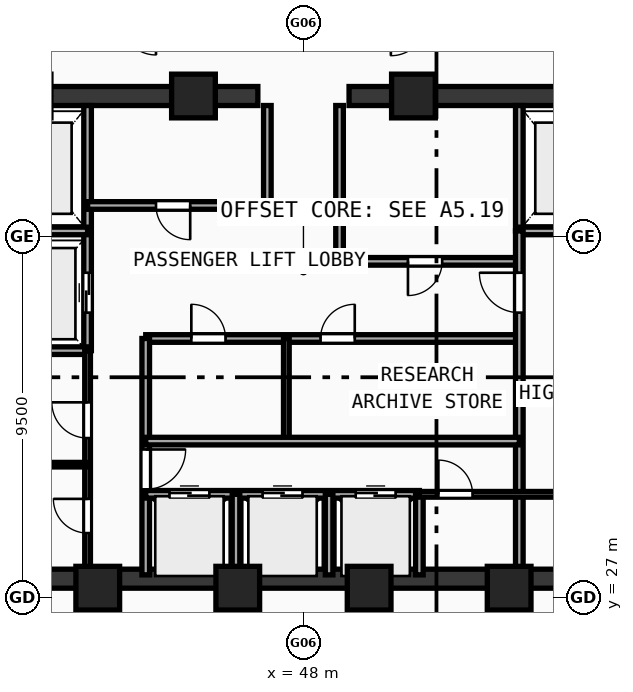
"""IFC4 building model, lengths in metres.
Left out: names, types, materials, properties, quantities, classifications, styles, units other than length and angle.
Written with IfcOpenShell. Run it as: python <this file> out.ifc"""

import sys

from ifc_helpers import new_model, si_unit, direction, frame, frame_2d, origin, origin_with_axes, origin_2d, place, context, subcontext, project, spatial, rectangle, hollow_rectangle, extrude, source, transform, mapped, element, fill, save


model = new_model("IFC4")
c1 = context("Model", 3, precision=1e-05, world=origin(), true_north=direction((0.0, 1.0)))
c2 = subcontext(c1, "Body", "Model", "MODEL_VIEW")
j1 = project(units=[si_unit("LENGTHUNIT", "METRE"), si_unit("PLANEANGLEUNIT", "RADIAN")], contexts=[c1])
p1 = place(None, origin())
s1 = spatial("IfcSite", under=j1, at=p1, CompositionType="ELEMENT")
p2 = place(p1, origin())
s2 = spatial("IfcBuilding", under=s1, at=p2, CompositionType="ELEMENT")
p3 = place(p2, frame((0.0, 0.0, 311.13)))
s3 = spatial("IfcBuildingStorey", under=s2, at=p3, CompositionType="ELEMENT", Elevation=311.13)
p4 = place(p3, frame((35.55, 27.5, 0.0), z_axis=(0.0, 0.0, 1.0), x_axis=(1.0, 0.0, 0.0)))
e1 = element("IfcWall", 1, at=p4, inside=s3, PredefinedType="SHEAR", context=c2, shape_type="SweptSolid", body=[
    extrude(rectangle(XDim=24.9, YDim=0.5, at=frame_2d((12.45, 0.0))), origin(), (0.0, 0.0, 1.0), 3.47),
])
p5 = place(p3, frame((35.55, 40.2, 0.0), z_axis=(0.0, 0.0, 1.0), x_axis=(1.0, 0.0, 0.0)))
e2 = element("IfcWall", 2, at=p5, inside=s3, PredefinedType="SHEAR", context=c2, shape_type="SweptSolid", body=[
    extrude(rectangle(XDim=11.25, YDim=0.5, at=frame_2d((5.625, 0.0))), origin(), (0.0, 0.0, 1.0), 3.47),
])
p6 = place(p5, frame((1.6, 0.0, 0.0)))
e3 = element("IfcOpeningElement", 3, at=p6, cuts=e2, PredefinedType="OPENING", context=c2, shape_type="SweptSolid", body=[
    extrude(rectangle(XDim=1.05, YDim=2.1, at=frame_2d((0.525, 1.05))), frame((0.0, 0.26, 0.0), z_axis=(0.0, -1.0, 0.0), x_axis=(1.0, 0.0, 0.0)), (0.0, 0.0, 1.0), 0.52),
])
p7 = place(p3, frame((49.2, 40.2, 0.0), z_axis=(0.0, 0.0, 1.0), x_axis=(1.0, 0.0, 0.0)))
e4 = element("IfcWall", 4, at=p7, inside=s3, PredefinedType="SHEAR", context=c2, shape_type="SweptSolid", body=[
    extrude(rectangle(XDim=11.25, YDim=0.5, at=frame_2d((5.625, 0.0))), origin(), (0.0, 0.0, 1.0), 3.47),
])
p8 = place(p7, frame((8.6, 0.0, 0.0)))
e5 = element("IfcOpeningElement", 5, at=p8, cuts=e4, PredefinedType="OPENING", context=c2, shape_type="SweptSolid", body=[
    extrude(rectangle(XDim=1.05, YDim=2.1, at=frame_2d((0.525, 1.05))), frame((0.0, 0.26, 0.0), z_axis=(0.0, -1.0, 0.0), x_axis=(1.0, 0.0, 0.0)), (0.0, 0.0, 1.0), 0.52),
])
m1 = source(origin(), c2, "Body", "SweptSolid", [
    extrude(hollow_rectangle(XDim=1.15, YDim=1.15, WallThickness=0.048, at=origin_2d()), origin(), (0.0, 0.0, 1.0), 3.73),
])
for number, where, z_axis, x_axis in (
    (6, (42.588, 27.25, -0.26), (0.0, 0.0, 1.0), (1.0, 0.0, 0.0)),
    (7, (46.272, 27.25, -0.26), (0.0, 0.0, 1.0), (1.0, 0.0, 0.0)),
    (8, (49.729, 27.25, -0.26), (0.0, 0.0, 1.0), (1.0, 0.0, 0.0)),
    (9, (53.412, 27.25, -0.26), (0.0, 0.0, 1.0), (1.0, 0.0, 0.0)),
    (10, (50.894, 40.2, -0.26), (0.0, 0.0, 1.0), (1.0, 0.0, 0.0)),
    (11, (45.106, 40.2, -0.26), (0.0, 0.0, 1.0), (1.0, 0.0, 0.0)),
):
    element("IfcColumn", number, at=place(p3, frame(where, z_axis=z_axis, x_axis=x_axis)), inside=s3, PredefinedType="COLUMN", context=c2, shape_type="MappedRepresentation", body=[
        mapped(m1, transform((0.0, 0.0, 0.0), scale=1.0)),
    ])
p9 = place(p3, frame((42.32, 33.5, 0.0), z_axis=(0.0, 0.0, 1.0), x_axis=(0.0, 1.0, 0.0)))
e12 = element("IfcWall", 12, at=p9, inside=s3, PredefinedType="SOLIDWALL", context=c2, shape_type="SweptSolid", body=[
    extrude(rectangle(XDim=6.45, YDim=0.2, at=frame_2d((3.225, 0.0))), origin(), (0.0, 0.0, 1.0), 3.47),
])
p10 = place(p9, frame((1.0, 0.0, 0.0)))
e13 = element("IfcOpeningElement", 13, at=p10, cuts=e12, PredefinedType="OPENING", context=c2, shape_type="SweptSolid", body=[
    extrude(rectangle(XDim=1.05, YDim=2.1, at=frame_2d((0.525, 1.05))), frame((0.0, 0.11, 0.0), z_axis=(0.0, -1.0, 0.0), x_axis=(1.0, 0.0, 0.0)), (0.0, 0.0, 1.0), 0.22),
])
for number, where, z_axis, x_axis in (
    (14, (39.6, 36.65, 0.0), (0.0, 0.0, 1.0), (1.0, 0.0, 0.0)),
    (15, (39.6, 33.5, 0.0), (0.0, 0.0, 1.0), (1.0, 0.0, 0.0)),
):
    element("IfcWall", number, at=place(p3, frame(where, z_axis=z_axis, x_axis=x_axis)), inside=s3, PredefinedType="SOLIDWALL", context=c2, shape_type="SweptSolid", body=[
        extrude(rectangle(XDim=2.72, YDim=0.2, at=frame_2d((1.36, 0.0))), origin(), (0.0, 0.0, 1.0), 3.47),
    ])
p11 = place(p3, frame((53.68, 36.65, 0.0), z_axis=(0.0, 0.0, 1.0), x_axis=(0.0, 1.0, 0.0)))
e16 = element("IfcWall", 16, at=p11, inside=s3, PredefinedType="SOLIDWALL", context=c2, shape_type="SweptSolid", body=[
    extrude(rectangle(XDim=3.3, YDim=0.2, at=frame_2d((1.65, 0.0))), origin(), (0.0, 0.0, 1.0), 3.47),
])
p12 = place(p3, frame((53.68, 36.65, 0.0), z_axis=(0.0, 0.0, 1.0), x_axis=(1.0, 0.0, 0.0)))
e17 = element("IfcWall", 17, at=p12, inside=s3, PredefinedType="SOLIDWALL", context=c2, shape_type="SweptSolid", body=[
    extrude(rectangle(XDim=2.72, YDim=0.2, at=frame_2d((1.36, 0.0))), origin(), (0.0, 0.0, 1.0), 3.47),
])
p13 = place(p3, frame((42.32, 37.32, 0.0), z_axis=(0.0, 0.0, 1.0), x_axis=(1.0, 0.0, 0.0)))
e18 = element("IfcWall", 18, at=p13, inside=s3, PredefinedType="SOLIDWALL", context=c2, shape_type="SweptSolid", body=[
    extrude(rectangle(XDim=4.73, YDim=0.2, at=frame_2d((2.365, 0.0))), origin(), (0.0, 0.0, 1.0), 3.47),
])
p14 = place(p13, frame((1.8, 0.0, 0.0)))
e19 = element("IfcOpeningElement", 19, at=p14, cuts=e18, PredefinedType="OPENING", context=c2, shape_type="SweptSolid", body=[
    extrude(rectangle(XDim=0.9, YDim=2.1, at=frame_2d((0.45, 1.05))), frame((0.0, 0.11, 0.0), z_axis=(0.0, -1.0, 0.0), x_axis=(1.0, 0.0, 0.0)), (0.0, 0.0, 1.0), 0.22),
])
p15 = place(p3, frame((48.95, 35.85, 0.0), z_axis=(0.0, 0.0, 1.0), x_axis=(1.0, 0.0, 0.0)))
e20 = element("IfcWall", 20, at=p15, inside=s3, PredefinedType="SOLIDWALL", context=c2, shape_type="SweptSolid", body=[
    extrude(rectangle(XDim=4.73, YDim=0.2, at=frame_2d((2.365, 0.0))), origin(), (0.0, 0.0, 1.0), 3.47),
])
p16 = place(p15, frame((1.8, 0.0, 0.0)))
e21 = element("IfcOpeningElement", 21, at=p16, cuts=e20, PredefinedType="OPENING", context=c2, shape_type="SweptSolid", body=[
    extrude(rectangle(XDim=0.9, YDim=2.1, at=frame_2d((0.45, 1.05))), frame((0.0, 0.11, 0.0), z_axis=(0.0, -1.0, 0.0), x_axis=(1.0, 0.0, 0.0)), (0.0, 0.0, 1.0), 0.22),
])
p17 = place(p3, frame((47.05, 37.32, 0.0), z_axis=(0.0, 0.0, 1.0), x_axis=(0.0, 1.0, 0.0)))
e22 = element("IfcWall", 22, at=p17, inside=s3, PredefinedType="SOLIDWALL", context=c2, shape_type="SweptSolid", body=[
    extrude(rectangle(XDim=2.63, YDim=0.2, at=frame_2d((1.315, 0.0))), origin(), (0.0, 0.0, 1.0), 3.47),
])
p18 = place(p3, frame((48.95, 35.85, 0.0), z_axis=(0.0, 0.0, 1.0), x_axis=(0.0, 1.0, 0.0)))
e23 = element("IfcWall", 23, at=p18, inside=s3, PredefinedType="SOLIDWALL", context=c2, shape_type="SweptSolid", body=[
    extrude(rectangle(XDim=4.1, YDim=0.2, at=frame_2d((2.05, 0.0))), origin(), (0.0, 0.0, 1.0), 3.47),
])
p19 = place(p3, frame((43.85, 33.82, 0.0), z_axis=(0.0, 0.0, 1.0), x_axis=(1.0, 0.0, 0.0)))
e24 = element("IfcWall", 24, at=p19, inside=s3, PredefinedType="SOLIDWALL", context=c2, shape_type="SweptSolid", body=[
    extrude(rectangle(XDim=9.83, YDim=0.2, at=frame_2d((4.915, 0.0))), origin(), (0.0, 0.0, 1.0), 3.47),
])
p20 = place(p19, frame((1.2, 0.0, 0.0)))
e25 = element("IfcOpeningElement", 25, at=p20, cuts=e24, PredefinedType="OPENING", context=c2, shape_type="SweptSolid", body=[
    extrude(rectangle(XDim=0.9, YDim=2.1, at=frame_2d((0.45, 1.05))), frame((0.0, 0.11, 0.0), z_axis=(0.0, -1.0, 0.0), x_axis=(1.0, 0.0, 0.0)), (0.0, 0.0, 1.0), 0.22),
])
p21 = place(p19, frame((4.6, 0.0, 0.0)))
e26 = element("IfcOpeningElement", 26, at=p21, cuts=e24, PredefinedType="OPENING", context=c2, shape_type="SweptSolid", body=[
    extrude(rectangle(XDim=0.9, YDim=2.1, at=frame_2d((0.45, 1.05))), frame((0.0, 0.11, 0.0), z_axis=(0.0, -1.0, 0.0), x_axis=(1.0, 0.0, 0.0)), (0.0, 0.0, 1.0), 0.22),
])
p22 = place(p3, frame((43.85, 27.6, 0.0), z_axis=(0.0, 0.0, 1.0), x_axis=(0.0, 1.0, 0.0)))
e27 = element("IfcWall", 27, at=p22, inside=s3, PredefinedType="SOLIDWALL", context=c2, shape_type="SweptSolid", body=[
    extrude(rectangle(XDim=6.22, YDim=0.2, at=frame_2d((3.11, 0.0))), origin(), (0.0, 0.0, 1.0), 3.47),
])
p23 = place(p22, frame((2.25, 0.0, 0.0)))
e28 = element("IfcOpeningElement", 28, at=p23, cuts=e27, PredefinedType="OPENING", context=c2, shape_type="SweptSolid", body=[
    extrude(rectangle(XDim=1.05, YDim=2.1, at=frame_2d((0.525, 1.05))), frame((0.0, 0.11, 0.0), z_axis=(0.0, -1.0, 0.0), x_axis=(1.0, 0.0, 0.0)), (0.0, 0.0, 1.0), 0.22),
])
p24 = place(p3, frame((53.68, 27.6, 0.0), z_axis=(0.0, 0.0, 1.0), x_axis=(0.0, 1.0, 0.0)))
e29 = element("IfcWall", 29, at=p24, inside=s3, PredefinedType="SOLIDWALL", context=c2, shape_type="SweptSolid", body=[
    extrude(rectangle(XDim=9.05, YDim=0.2, at=frame_2d((4.525, 0.0))), origin(), (0.0, 0.0, 1.0), 3.47),
])
p25 = place(p24, frame((6.9, 0.0, 0.0)))
e30 = element("IfcOpeningElement", 30, at=p25, cuts=e29, PredefinedType="OPENING", context=c2, shape_type="SweptSolid", body=[
    extrude(rectangle(XDim=1.05, YDim=2.1, at=frame_2d((0.525, 1.05))), frame((0.0, 0.11, 0.0), z_axis=(0.0, -1.0, 0.0), x_axis=(1.0, 0.0, 0.0)), (0.0, 0.0, 1.0), 0.22),
])
p26 = place(p3, frame((47.55, 31.12, 0.0), z_axis=(0.0, 0.0, 1.0), x_axis=(0.0, 1.0, 0.0)))
e31 = element("IfcWall", 31, at=p26, inside=s3, PredefinedType="PARTITIONING", context=c2, shape_type="SweptSolid", body=[
    extrude(rectangle(XDim=2.7, YDim=0.15, at=frame_2d((1.35, 0.0))), origin(), (0.0, 0.0, 1.0), 3.47),
])
p27 = place(p3, frame((43.85, 29.72, 0.0), z_axis=(0.0, 0.0, 1.0), x_axis=(1.0, 0.0, 0.0)))
e32 = element("IfcWall", 32, at=p27, inside=s3, PredefinedType="SOLIDWALL", context=c2, shape_type="SweptSolid", body=[
    extrude(rectangle(XDim=7.2, YDim=0.2, at=frame_2d((3.6, 0.0))), origin(), (0.0, 0.0, 1.0), 3.47),
])
p28 = place(p27, frame((0.625, 0.0, 0.0)))
e33 = element("IfcOpeningElement", 33, at=p28, cuts=e32, PredefinedType="OPENING", context=c2, shape_type="SweptSolid", body=[
    extrude(rectangle(XDim=1.05, YDim=2.1, at=frame_2d((0.525, 1.05))), frame((0.0, 0.11, 0.0), z_axis=(0.0, -1.0, 0.0), x_axis=(1.0, 0.0, 0.0)), (0.0, 0.0, 1.0), 0.22),
])
p29 = place(p27, frame((3.075, 0.0, 0.0)))
e34 = element("IfcOpeningElement", 34, at=p29, cuts=e32, PredefinedType="OPENING", context=c2, shape_type="SweptSolid", body=[
    extrude(rectangle(XDim=1.05, YDim=2.1, at=frame_2d((0.525, 1.05))), frame((0.0, 0.11, 0.0), z_axis=(0.0, -1.0, 0.0), x_axis=(1.0, 0.0, 0.0)), (0.0, 0.0, 1.0), 0.22),
])
p30 = place(p27, frame((5.525, 0.0, 0.0)))
e35 = element("IfcOpeningElement", 35, at=p30, cuts=e32, PredefinedType="OPENING", context=c2, shape_type="SweptSolid", body=[
    extrude(rectangle(XDim=1.05, YDim=2.1, at=frame_2d((0.525, 1.05))), frame((0.0, 0.11, 0.0), z_axis=(0.0, -1.0, 0.0), x_axis=(1.0, 0.0, 0.0)), (0.0, 0.0, 1.0), 0.22),
])
p31 = place(p3, frame((51.05, 27.6, 0.0), z_axis=(0.0, 0.0, 1.0), x_axis=(0.0, 1.0, 0.0)))
e36 = element("IfcWall", 36, at=p31, inside=s3, PredefinedType="SOLIDWALL", context=c2, shape_type="SweptSolid", body=[
    extrude(rectangle(XDim=2.12, YDim=0.2, at=frame_2d((1.06, 0.0))), origin(), (0.0, 0.0, 1.0), 3.47),
])
p32 = place(p3, frame((43.85, 31.12, 0.0), z_axis=(0.0, 0.0, 1.0), x_axis=(1.0, 0.0, 0.0)))
e37 = element("IfcWall", 37, at=p32, inside=s3, PredefinedType="SOLIDWALL", context=c2, shape_type="SweptSolid", body=[
    extrude(rectangle(XDim=9.83, YDim=0.2, at=frame_2d((4.915, 0.0))), origin(), (0.0, 0.0, 1.0), 3.47),
])
for number, where, z_axis, x_axis in (
    (38, (46.225, 27.6, 0.0), (0.0, 0.0, 1.0), (0.0, 1.0, 0.0)),
    (39, (48.675, 27.6, 0.0), (0.0, 0.0, 1.0), (0.0, 1.0, 0.0)),
):
    element("IfcWall", number, at=place(p3, frame(where, z_axis=z_axis, x_axis=x_axis)), inside=s3, PredefinedType="SOLIDWALL", context=c2, shape_type="SweptSolid", body=[
        extrude(rectangle(XDim=2.12, YDim=0.2, at=frame_2d((1.06, 0.0))), origin(), (0.0, 0.0, 1.0), 3.47),
    ])
p33 = place(p3, frame((42.32, 27.6, 0.0), z_axis=(0.0, 0.0, 1.0), x_axis=(0.0, 1.0, 0.0)))
e40 = element("IfcWall", 40, at=p33, inside=s3, PredefinedType="PARTITIONING", context=c2, shape_type="SweptSolid", body=[
    extrude(rectangle(XDim=5.9, YDim=0.15, at=frame_2d((2.95, 0.0))), origin(), (0.0, 0.0, 1.0), 3.47),
])
p34 = place(p33, frame((1.1, 0.0, 0.0)))
e41 = element("IfcOpeningElement", 41, at=p34, cuts=e40, PredefinedType="OPENING", context=c2, shape_type="SweptSolid", body=[
    extrude(rectangle(XDim=0.9, YDim=2.1, at=frame_2d((0.45, 1.05))), frame((0.0, 0.085, 0.0), z_axis=(0.0, -1.0, 0.0), x_axis=(1.0, 0.0, 0.0)), (0.0, 0.0, 1.0), 0.17),
])
p35 = place(p33, frame((3.6, 0.0, 0.0)))
e42 = element("IfcOpeningElement", 42, at=p35, cuts=e40, PredefinedType="OPENING", context=c2, shape_type="SweptSolid", body=[
    extrude(rectangle(XDim=0.94, YDim=2.1, at=frame_2d((0.47, 1.05))), frame((0.0, 0.085, 0.0), z_axis=(0.0, -1.0, 0.0), x_axis=(1.0, 0.0, 0.0)), (0.0, 0.0, 1.0), 0.17),
])
p36 = place(p3, frame((51.05, 29.72, 0.0), z_axis=(0.0, 0.0, 1.0), x_axis=(1.0, 0.0, 0.0)))
e43 = element("IfcWall", 43, at=p36, inside=s3, PredefinedType="PARTITIONING", context=c2, shape_type="SweptSolid", body=[
    extrude(rectangle(XDim=4.07, YDim=0.15, at=frame_2d((2.035, 0.0))), origin(), (0.0, 0.0, 1.0), 3.47),
])
p37 = place(p36, frame((0.5, 0.0, 0.0)))
e44 = element("IfcOpeningElement", 44, at=p37, cuts=e43, PredefinedType="OPENING", context=c2, shape_type="SweptSolid", body=[
    extrude(rectangle(XDim=0.9, YDim=2.1, at=frame_2d((0.45, 1.05))), frame((0.0, 0.085, 0.0), z_axis=(0.0, -1.0, 0.0), x_axis=(1.0, 0.0, 0.0)), (0.0, 0.0, 1.0), 0.17),
])
p38 = place(p3, frame((39.6, 30.5, 0.0), z_axis=(0.0, 0.0, 1.0), x_axis=(1.0, 0.0, 0.0)))
e45 = element("IfcWall", 45, at=p38, inside=s3, PredefinedType="PARTITIONING", context=c2, shape_type="SweptSolid", body=[
    extrude(rectangle(XDim=2.72, YDim=0.12, at=frame_2d((1.36, 0.0))), origin(), (0.0, 0.0, 1.0), 3.47),
])
m2 = source(origin(), c2, "Body", "SweptSolid", [
    extrude(rectangle(XDim=1.05, YDim=2.1, at=frame_2d((0.525, 1.05))), frame((0.0, 0.025, 0.0), z_axis=(0.0, -1.0, 0.0), x_axis=(1.0, 0.0, 0.0)), (0.0, 0.0, 1.0), 0.05),
])
p39 = place(p10, origin_with_axes())
e46 = element("IfcDoor", 46, at=p39, inside=s3, OperationType="DOUBLE_DOOR_SLIDING", PredefinedType="DOOR", context=c2, shape_type="MappedRepresentation", body=[
    mapped(m2, transform((0.0, 0.0, 0.0), scale=1.0)),
])
fill(e13, e46)
m3 = source(origin(), c2, "Body", "SweptSolid", [
    extrude(rectangle(XDim=0.9, YDim=2.1, at=frame_2d((0.45, 1.05))), frame((0.0, 0.025, 0.0), z_axis=(0.0, -1.0, 0.0), x_axis=(1.0, 0.0, 0.0)), (0.0, 0.0, 1.0), 0.05),
])
p40 = place(p14, frame((0.9, 0.0, 0.0), z_axis=(0.0, 0.0, 1.0), x_axis=(-1.0, 0.0, 0.0)))
e47 = element("IfcDoor", 47, at=p40, inside=s3, OperationType="SINGLE_SWING_LEFT", PredefinedType="DOOR", context=c2, shape_type="MappedRepresentation", body=[
    mapped(m3, transform((0.0, 0.0, 0.0), scale=1.0)),
])
fill(e19, e47)
p41 = place(p16, frame((0.9, 0.0, 0.0), z_axis=(0.0, 0.0, 1.0), x_axis=(-1.0, 0.0, 0.0)))
e48 = element("IfcDoor", 48, at=p41, inside=s3, OperationType="SINGLE_SWING_RIGHT", PredefinedType="DOOR", context=c2, shape_type="MappedRepresentation", body=[
    mapped(m3, transform((0.0, 0.0, 0.0), scale=1.0)),
])
fill(e21, e48)
p42 = place(p20, origin_with_axes())
e49 = element("IfcDoor", 49, at=p42, inside=s3, OperationType="SINGLE_SWING_LEFT", PredefinedType="DOOR", context=c2, shape_type="MappedRepresentation", body=[
    mapped(m3, transform((0.0, 0.0, 0.0), scale=1.0)),
])
fill(e25, e49)
p43 = place(p21, origin_with_axes())
e50 = element("IfcDoor", 50, at=p43, inside=s3, OperationType="SINGLE_SWING_RIGHT", PredefinedType="DOOR", context=c2, shape_type="MappedRepresentation", body=[
    mapped(m3, transform((0.0, 0.0, 0.0), scale=1.0)),
])
fill(e26, e50)
p44 = place(p23, frame((1.05, 0.0, 0.0), z_axis=(0.0, 0.0, 1.0), x_axis=(-1.0, 0.0, 0.0)))
e51 = element("IfcDoor", 51, at=p44, inside=s3, OperationType="SINGLE_SWING_LEFT", PredefinedType="DOOR", context=c2, shape_type="MappedRepresentation", body=[
    mapped(m2, transform((0.0, 0.0, 0.0), scale=1.0)),
])
fill(e28, e51)
p45 = place(p25, origin_with_axes())
e52 = element("IfcDoor", 52, at=p45, inside=s3, OperationType="SINGLE_SWING_RIGHT", PredefinedType="DOOR", context=c2, shape_type="MappedRepresentation", body=[
    mapped(m2, transform((0.0, 0.0, 0.0), scale=1.0)),
])
fill(e30, e52)
p46 = place(p28, origin_with_axes())
e53 = element("IfcDoor", 53, at=p46, inside=s3, OperationType="DOUBLE_DOOR_SLIDING", PredefinedType="DOOR", context=c2, shape_type="MappedRepresentation", body=[
    mapped(m2, transform((0.0, 0.0, 0.0), scale=1.0)),
])
fill(e33, e53)
p47 = place(p29, origin_with_axes())
e54 = element("IfcDoor", 54, at=p47, inside=s3, OperationType="DOUBLE_DOOR_SLIDING", PredefinedType="DOOR", context=c2, shape_type="MappedRepresentation", body=[
    mapped(m2, transform((0.0, 0.0, 0.0), scale=1.0)),
])
fill(e34, e54)
p48 = place(p30, origin_with_axes())
e55 = element("IfcDoor", 55, at=p48, inside=s3, OperationType="DOUBLE_DOOR_SLIDING", PredefinedType="DOOR", context=c2, shape_type="MappedRepresentation", body=[
    mapped(m2, transform((0.0, 0.0, 0.0), scale=1.0)),
])
fill(e35, e55)
p49 = place(p34, origin_with_axes())
e56 = element("IfcDoor", 56, at=p49, inside=s3, OperationType="SINGLE_SWING_RIGHT", PredefinedType="DOOR", context=c2, shape_type="MappedRepresentation", body=[
    mapped(m3, transform((0.0, 0.0, 0.0), scale=1.0)),
])
fill(e41, e56)
m4 = source(origin(), c2, "Body", "SweptSolid", [
    extrude(rectangle(XDim=0.94, YDim=2.1, at=frame_2d((0.47, 1.05))), frame((0.0, 0.025, 0.0), z_axis=(0.0, -1.0, 0.0), x_axis=(1.0, 0.0, 0.0)), (0.0, 0.0, 1.0), 0.05),
])
p50 = place(p35, origin_with_axes())
e57 = element("IfcDoor", 57, at=p50, inside=s3, OperationType="SINGLE_SWING_RIGHT", PredefinedType="DOOR", context=c2, shape_type="MappedRepresentation", body=[
    mapped(m4, transform((0.0, 0.0, 0.0), scale=1.0)),
])
fill(e42, e57)
p51 = place(p37, origin_with_axes())
e58 = element("IfcDoor", 58, at=p51, inside=s3, OperationType="SINGLE_SWING_LEFT", PredefinedType="DOOR", context=c2, shape_type="MappedRepresentation", body=[
    mapped(m3, transform((0.0, 0.0, 0.0), scale=1.0)),
])
fill(e44, e58)
save(model, sys.argv[1])
